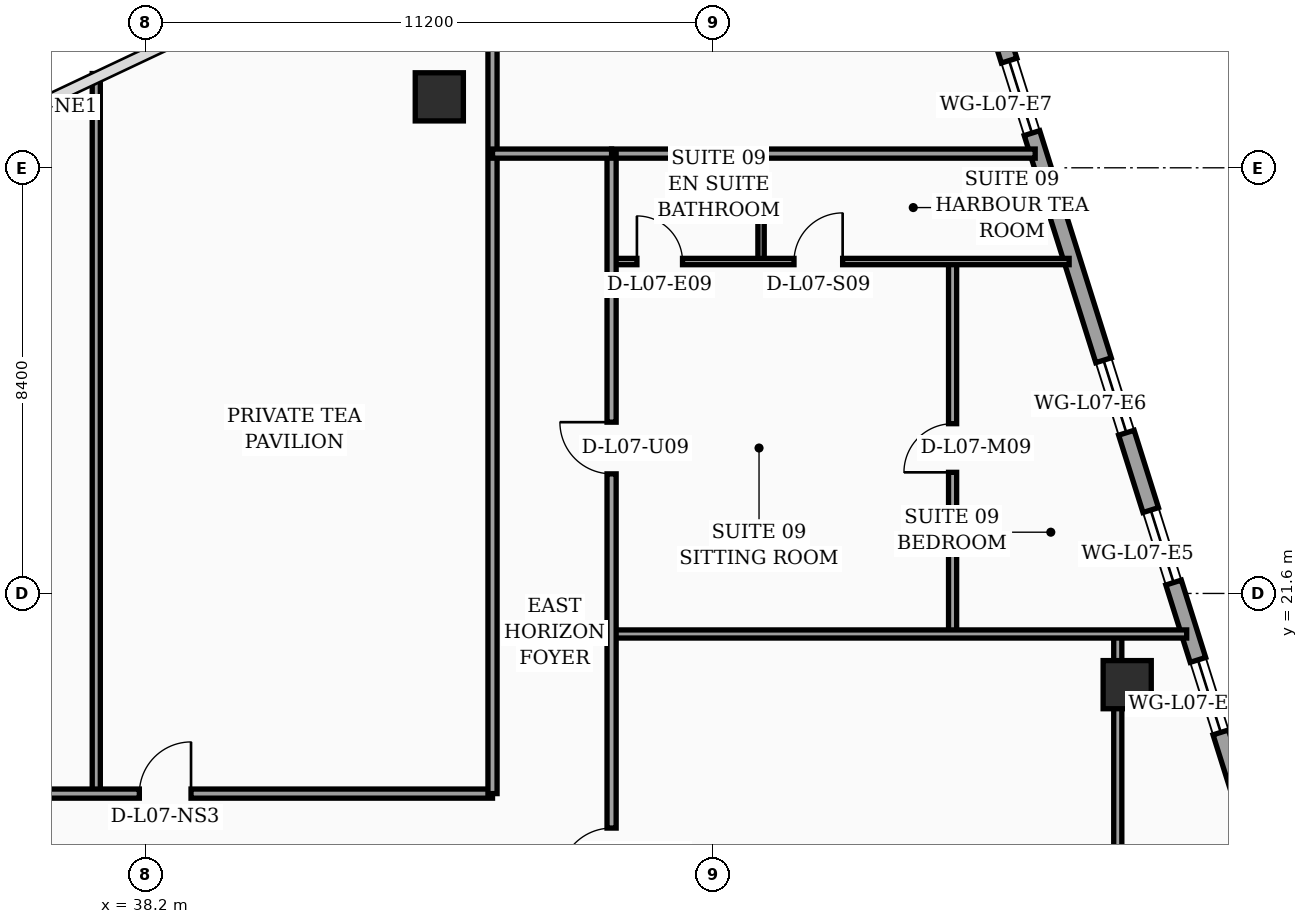
"""IFC4 building model, lengths in metres.
Left out: names, types, materials, properties, quantities, classifications, styles, units other than length and angle.
Written with IfcOpenShell. Run it as: python <this file> out.ifc"""

import sys

from ifc_helpers import new_model, si_unit, direction, frame, frame_2d, origin, origin_2d, place, context, subcontext, project, spatial, rectangle, hollow_rectangle, extrude, element, fill, save


model = new_model("IFC4")
c1 = context("Model", 3, precision=1e-05, world=origin(), true_north=direction((0.0, 1.0)))
c2 = subcontext(c1, "Body", "Model", "MODEL_VIEW")
j1 = project(units=[si_unit("LENGTHUNIT", "METRE"), si_unit("PLANEANGLEUNIT", "RADIAN")], contexts=[c1])
p1 = place(None, origin())
s1 = spatial("IfcSite", under=j1, at=p1, CompositionType="ELEMENT")
p2 = place(p1, origin())
s2 = spatial("IfcBuilding", under=s1, at=p2, CompositionType="ELEMENT")
p3 = place(p2, frame((0.0, 0.0, 34.6)))
s3 = spatial("IfcBuildingStorey", under=s2, at=p3, CompositionType="ELEMENT", Elevation=34.6)
for number, where, z_axis, x_axis in (
    (1, (44.0, 31.4, 0.0), (0.0, 0.0, 1.0), (1.0, 0.0, 0.0)),
    (2, (57.576, 19.8, 0.0), (0.0, 0.0, 1.0), (1.0, 0.0, 0.0)),
):
    element("IfcColumn", number, at=place(p3, frame(where, z_axis=z_axis, x_axis=x_axis)), inside=s3, PredefinedType="COLUMN", context=c2, shape_type="SweptSolid", body=[
        extrude(hollow_rectangle(XDim=0.95, YDim=0.95, WallThickness=0.04, at=origin_2d()), origin(), (0.0, 0.0, 1.0), 3.56),
    ])
p4 = place(p3, frame((63.63, 5.505, 0.0), z_axis=(0.0, 0.0, 1.0), x_axis=(-0.300501856448, 0.953781229775, 0.0)))
e3 = element("IfcWall", 3, at=p4, inside=s3, PredefinedType="SOLIDWALL", context=c2, shape_type="SweptSolid", body=[
    extrude(rectangle(XDim=30.814, YDim=0.32, at=frame_2d((15.407, 0.0))), origin(), (0.0, 0.0, 1.0), 3.56),
])
p5 = place(p4, frame((10.199, 0.0, 0.0)))
e4 = element("IfcOpeningElement", 4, at=p5, cuts=e3, PredefinedType="OPENING", context=c2, shape_type="SweptSolid", body=[
    extrude(rectangle(XDim=1.4, YDim=2.25, at=frame_2d((0.7, 1.125))), frame((0.0, 0.17, 0.0), z_axis=(0.0, -1.0, 0.0), x_axis=(1.0, 0.0, 0.0)), (0.0, 0.0, 1.0), 0.34),
])
p6 = place(p4, frame((2.65, 0.0, 0.75)))
e5 = element("IfcOpeningElement", 5, at=p6, cuts=e3, PredefinedType="OPENING", context=c2, shape_type="SweptSolid", body=[
    extrude(rectangle(XDim=1.5, YDim=1.6, at=frame_2d((0.75, 0.8))), frame((0.0, 0.17, 0.0), z_axis=(0.0, -1.0, 0.0), x_axis=(1.0, 0.0, 0.0)), (0.0, 0.0, 1.0), 0.34),
])
p7 = place(p4, frame((4.7, 0.0, 0.75)))
e6 = element("IfcOpeningElement", 6, at=p7, cuts=e3, PredefinedType="OPENING", context=c2, shape_type="SweptSolid", body=[
    extrude(rectangle(XDim=1.5, YDim=1.6, at=frame_2d((0.75, 0.8))), frame((0.0, 0.17, 0.0), z_axis=(0.0, -1.0, 0.0), x_axis=(1.0, 0.0, 0.0)), (0.0, 0.0, 1.0), 0.34),
])
p8 = place(p4, frame((7.8, 0.0, 0.75)))
e7 = element("IfcOpeningElement", 7, at=p8, cuts=e3, PredefinedType="OPENING", context=c2, shape_type="SweptSolid", body=[
    extrude(rectangle(XDim=1.5, YDim=1.6, at=frame_2d((0.75, 0.8))), frame((0.0, 0.17, 0.0), z_axis=(0.0, -1.0, 0.0), x_axis=(1.0, 0.0, 0.0)), (0.0, 0.0, 1.0), 0.34),
])
p9 = place(p4, frame((14.0, 0.0, 0.75)))
e8 = element("IfcOpeningElement", 8, at=p9, cuts=e3, PredefinedType="OPENING", context=c2, shape_type="SweptSolid", body=[
    extrude(rectangle(XDim=1.5, YDim=1.6, at=frame_2d((0.75, 0.8))), frame((0.0, 0.17, 0.0), z_axis=(0.0, -1.0, 0.0), x_axis=(1.0, 0.0, 0.0)), (0.0, 0.0, 1.0), 0.34),
])
p10 = place(p4, frame((17.1, 0.0, 0.75)))
e9 = element("IfcOpeningElement", 9, at=p10, cuts=e3, PredefinedType="OPENING", context=c2, shape_type="SweptSolid", body=[
    extrude(rectangle(XDim=1.5, YDim=1.6, at=frame_2d((0.75, 0.8))), frame((0.0, 0.17, 0.0), z_axis=(0.0, -1.0, 0.0), x_axis=(1.0, 0.0, 0.0)), (0.0, 0.0, 1.0), 0.34),
])
p11 = place(p4, frame((20.2, 0.0, 0.75)))
e10 = element("IfcOpeningElement", 10, at=p11, cuts=e3, PredefinedType="OPENING", context=c2, shape_type="SweptSolid", body=[
    extrude(rectangle(XDim=1.5, YDim=1.6, at=frame_2d((0.75, 0.8))), frame((0.0, 0.17, 0.0), z_axis=(0.0, -1.0, 0.0), x_axis=(1.0, 0.0, 0.0)), (0.0, 0.0, 1.0), 0.34),
])
p12 = place(p4, frame((26.4, 0.0, 0.75)))
e11 = element("IfcOpeningElement", 11, at=p12, cuts=e3, PredefinedType="OPENING", context=c2, shape_type="SweptSolid", body=[
    extrude(rectangle(XDim=1.5, YDim=1.6, at=frame_2d((0.75, 0.8))), frame((0.0, 0.17, 0.0), z_axis=(0.0, -1.0, 0.0), x_axis=(1.0, 0.0, 0.0)), (0.0, 0.0, 1.0), 0.34),
])
p13 = place(p3, frame((37.23, 17.65, 0.0), z_axis=(0.0, 0.0, 1.0), x_axis=(0.0, 1.0, 0.0)))
e12 = element("IfcWall", 12, at=p13, inside=s3, PredefinedType="PARTITIONING", context=c2, shape_type="SweptSolid", body=[
    extrude(rectangle(XDim=14.21, YDim=0.16, at=frame_2d((7.105, 0.0))), origin(), (0.0, 0.0, 1.0), 2.84),
])
p14 = place(p3, frame((21.5, 17.65, 0.0), z_axis=(0.0, 0.0, 1.0), x_axis=(1.0, 0.0, 0.0)))
e13 = element("IfcWall", 13, at=p14, inside=s3, PredefinedType="PARTITIONING", context=c2, shape_type="SweptSolid", body=[
    extrude(rectangle(XDim=23.55, YDim=0.18, at=frame_2d((11.775, 0.0))), origin(), (0.0, 0.0, 1.0), 2.84),
])
p15 = place(p14, frame((0.95, 0.0, 0.0)))
e14 = element("IfcOpeningElement", 14, at=p15, cuts=e13, PredefinedType="OPENING", context=c2, shape_type="SweptSolid", body=[
    extrude(rectangle(XDim=1.02, YDim=2.2, at=frame_2d((0.51, 1.1))), frame((0.0, 0.1, 0.0), z_axis=(0.0, -1.0, 0.0), x_axis=(1.0, 0.0, 0.0)), (0.0, 0.0, 1.0), 0.2),
])
p16 = place(p14, frame((9.42, 0.0, 0.0)))
e15 = element("IfcOpeningElement", 15, at=p16, cuts=e13, PredefinedType="OPENING", context=c2, shape_type="SweptSolid", body=[
    extrude(rectangle(XDim=1.02, YDim=2.2, at=frame_2d((0.51, 1.1))), frame((0.0, 0.1, 0.0), z_axis=(0.0, -1.0, 0.0), x_axis=(1.0, 0.0, 0.0)), (0.0, 0.0, 1.0), 0.2),
])
p17 = place(p14, frame((16.58, 0.0, 0.0)))
e16 = element("IfcOpeningElement", 16, at=p17, cuts=e13, PredefinedType="OPENING", context=c2, shape_type="SweptSolid", body=[
    extrude(rectangle(XDim=1.02, YDim=2.2, at=frame_2d((0.51, 1.1))), frame((0.0, 0.1, 0.0), z_axis=(0.0, -1.0, 0.0), x_axis=(1.0, 0.0, 0.0)), (0.0, 0.0, 1.0), 0.2),
])
p18 = place(p3, frame((45.05, 17.65, 0.0), z_axis=(0.0, 0.0, 1.0), x_axis=(0.0, 1.0, 0.0)))
e17 = element("IfcWall", 17, at=p18, inside=s3, PredefinedType="PARTITIONING", context=c2, shape_type="SweptSolid", body=[
    extrude(rectangle(XDim=17.9, YDim=0.18, at=frame_2d((8.95, 0.0))), origin(), (0.0, 0.0, 1.0), 2.84),
])
p19 = place(p3, frame((57.39, 7.45, 0.0), z_axis=(0.0, 0.0, 1.0), x_axis=(0.0, 1.0, 0.0)))
e18 = element("IfcWall", 18, at=p19, inside=s3, PredefinedType="PARTITIONING", context=c2, shape_type="SweptSolid", body=[
    extrude(rectangle(XDim=13.35, YDim=0.16, at=frame_2d((6.675, 0.0))), origin(), (0.0, 0.0, 1.0), 2.84),
])
p20 = place(p19, frame((6.2, 0.0, 0.0)))
e19 = element("IfcOpeningElement", 19, at=p20, cuts=e18, PredefinedType="OPENING", context=c2, shape_type="SweptSolid", body=[
    extrude(rectangle(XDim=0.96, YDim=2.2, at=frame_2d((0.48, 1.1))), frame((0.0, 0.09, 0.0), z_axis=(0.0, -1.0, 0.0), x_axis=(1.0, 0.0, 0.0)), (0.0, 0.0, 1.0), 0.18),
])
p21 = place(p3, frame((50.35, 28.15, 0.0), z_axis=(0.0, 0.0, 1.0), x_axis=(0.0, 1.0, 0.0)))
e20 = element("IfcWall", 20, at=p21, inside=s3, PredefinedType="PARTITIONING", context=c2, shape_type="SweptSolid", body=[
    extrude(rectangle(XDim=2.13, YDim=0.125, at=frame_2d((1.065, 0.0))), origin(), (0.0, 0.0, 1.0), 3.56),
])
p22 = place(p3, frame((54.13, 20.8, 0.0), z_axis=(0.0, 0.0, 1.0), x_axis=(0.0, 1.0, 0.0)))
e21 = element("IfcWall", 21, at=p22, inside=s3, PredefinedType="PARTITIONING", context=c2, shape_type="SweptSolid", body=[
    extrude(rectangle(XDim=7.35, YDim=0.16, at=frame_2d((3.675, 0.0))), origin(), (0.0, 0.0, 1.0), 3.19),
])
p23 = place(p22, frame((3.19, 0.0, 0.0)))
e22 = element("IfcOpeningElement", 22, at=p23, cuts=e21, PredefinedType="OPENING", context=c2, shape_type="SweptSolid", body=[
    extrude(rectangle(XDim=0.96, YDim=2.2, at=frame_2d((0.48, 1.1))), frame((0.0, 0.09, 0.0), z_axis=(0.0, -1.0, 0.0), x_axis=(1.0, 0.0, 0.0)), (0.0, 0.0, 1.0), 0.18),
])
p24 = place(p3, frame((47.4, 28.15, 0.0), z_axis=(0.0, 0.0, 1.0), x_axis=(1.0, 0.0, 0.0)))
e23 = element("IfcWall", 23, at=p24, inside=s3, PredefinedType="PARTITIONING", context=c2, shape_type="SweptSolid", body=[
    extrude(rectangle(XDim=9.03, YDim=0.125, at=frame_2d((4.515, 0.0))), origin(), (0.0, 0.0, 1.0), 2.84),
])
p25 = place(p24, frame((0.5, 0.0, 0.0)))
e24 = element("IfcOpeningElement", 24, at=p25, cuts=e23, PredefinedType="OPENING", context=c2, shape_type="SweptSolid", body=[
    extrude(rectangle(XDim=0.9, YDim=2.15, at=frame_2d((0.45, 1.075))), frame((0.0, 0.073, 0.0), z_axis=(0.0, -1.0, 0.0), x_axis=(1.0, 0.0, 0.0)), (0.0, 0.0, 1.0), 0.145),
])
p26 = place(p24, frame((3.6, 0.0, 0.0)))
e25 = element("IfcOpeningElement", 25, at=p26, cuts=e23, PredefinedType="OPENING", context=c2, shape_type="SweptSolid", body=[
    extrude(rectangle(XDim=0.96, YDim=2.2, at=frame_2d((0.48, 1.1))), frame((0.0, 0.073, 0.0), z_axis=(0.0, -1.0, 0.0), x_axis=(1.0, 0.0, 0.0)), (0.0, 0.0, 1.0), 0.145),
])
p27 = place(p3, frame((47.4, 20.8, 0.0), z_axis=(0.0, 0.0, 1.0), x_axis=(1.0, 0.0, 0.0)))
e26 = element("IfcWall", 26, at=p27, inside=s3, PredefinedType="PARTITIONING", context=c2, shape_type="SweptSolid", body=[
    extrude(rectangle(XDim=11.35, YDim=0.16, at=frame_2d((5.675, 0.0))), origin(), (0.0, 0.0, 1.0), 3.04),
])
p28 = place(p3, frame((47.4, 30.28, 0.0), z_axis=(0.0, 0.0, 1.0), x_axis=(1.0, 0.0, 0.0)))
e27 = element("IfcWall", 27, at=p28, inside=s3, PredefinedType="PARTITIONING", context=c2, shape_type="SweptSolid", body=[
    extrude(rectangle(XDim=8.36, YDim=0.18, at=frame_2d((4.18, 0.0))), origin(), (0.0, 0.0, 1.0), 2.84),
])
p29 = place(p3, frame((47.4, 2.44, 0.0), z_axis=(0.0, 0.0, 1.0), x_axis=(0.0, 1.0, 0.0)))
e28 = element("IfcWall", 28, at=p29, inside=s3, PredefinedType="PARTITIONING", context=c2, shape_type="SweptSolid", body=[
    extrude(rectangle(XDim=27.84, YDim=0.18, at=frame_2d((13.92, 0.0))), origin(), (0.0, 0.0, 1.0), 2.84),
])
p30 = place(p29, frame((13.51, 0.0, 0.0)))
e29 = element("IfcOpeningElement", 29, at=p30, cuts=e28, PredefinedType="OPENING", context=c2, shape_type="SweptSolid", body=[
    extrude(rectangle(XDim=1.02, YDim=2.2, at=frame_2d((0.51, 1.1))), frame((0.0, 0.1, 0.0), z_axis=(0.0, -1.0, 0.0), x_axis=(1.0, 0.0, 0.0)), (0.0, 0.0, 1.0), 0.2),
])
p31 = place(p29, frame((21.52, 0.0, 0.0)))
e30 = element("IfcOpeningElement", 30, at=p31, cuts=e28, PredefinedType="OPENING", context=c2, shape_type="SweptSolid", body=[
    extrude(rectangle(XDim=1.02, YDim=2.2, at=frame_2d((0.51, 1.1))), frame((0.0, 0.1, 0.0), z_axis=(0.0, -1.0, 0.0), x_axis=(1.0, 0.0, 0.0)), (0.0, 0.0, 1.0), 0.2),
])
p32 = place(p3, frame((45.05, 30.28, 0.0), z_axis=(0.0, 0.0, 1.0), x_axis=(1.0, 0.0, 0.0)))
e31 = element("IfcWall", 31, at=p32, inside=s3, PredefinedType="PARTITIONING", context=c2, shape_type="SweptSolid", body=[
    extrude(rectangle(XDim=2.35, YDim=0.18, at=frame_2d((1.175, 0.0))), origin(), (0.0, 0.0, 1.0), 3.56),
])
p33 = place(p9, origin())
e32 = element("IfcWindow", 32, at=p33, inside=s3, PartitioningType="SINGLE_PANEL", PredefinedType="WINDOW", context=c2, shape_type="SweptSolid", body=[
    extrude(rectangle(XDim=1.5, YDim=1.6, at=frame_2d((0.75, 0.8))), frame((0.0, 0.03, 0.0), z_axis=(0.0, -1.0, 0.0), x_axis=(1.0, 0.0, 0.0)), (0.0, 0.0, 1.0), 0.06),
])
fill(e8, e32)
p34 = place(p10, origin())
e33 = element("IfcWindow", 33, at=p34, inside=s3, PartitioningType="SINGLE_PANEL", PredefinedType="WINDOW", context=c2, shape_type="SweptSolid", body=[
    extrude(rectangle(XDim=1.5, YDim=1.6, at=frame_2d((0.75, 0.8))), frame((0.0, 0.03, 0.0), z_axis=(0.0, -1.0, 0.0), x_axis=(1.0, 0.0, 0.0)), (0.0, 0.0, 1.0), 0.06),
])
fill(e9, e33)
p35 = place(p11, origin())
e34 = element("IfcWindow", 34, at=p35, inside=s3, PartitioningType="SINGLE_PANEL", PredefinedType="WINDOW", context=c2, shape_type="SweptSolid", body=[
    extrude(rectangle(XDim=1.5, YDim=1.6, at=frame_2d((0.75, 0.8))), frame((0.0, 0.03, 0.0), z_axis=(0.0, -1.0, 0.0), x_axis=(1.0, 0.0, 0.0)), (0.0, 0.0, 1.0), 0.06),
])
fill(e10, e34)
p36 = place(p12, origin())
e35 = element("IfcWindow", 35, at=p36, inside=s3, PartitioningType="SINGLE_PANEL", PredefinedType="WINDOW", context=c2, shape_type="SweptSolid", body=[
    extrude(rectangle(XDim=1.5, YDim=1.6, at=frame_2d((0.75, 0.8))), frame((0.0, 0.03, 0.0), z_axis=(0.0, -1.0, 0.0), x_axis=(1.0, 0.0, 0.0)), (0.0, 0.0, 1.0), 0.06),
])
fill(e11, e35)
p37 = place(p17, origin())
e36 = element("IfcDoor", 36, at=p37, inside=s3, OperationType="SINGLE_SWING_RIGHT", PredefinedType="DOOR", context=c2, shape_type="SweptSolid", body=[
    extrude(rectangle(XDim=1.02, YDim=2.2, at=frame_2d((0.51, 1.1))), frame((0.0, 0.025, 0.0), z_axis=(0.0, -1.0, 0.0), x_axis=(1.0, 0.0, 0.0)), (0.0, 0.0, 1.0), 0.05),
])
fill(e16, e36)
p38 = place(p23, origin())
e37 = element("IfcDoor", 37, at=p38, inside=s3, OperationType="SINGLE_SWING_LEFT", PredefinedType="DOOR", context=c2, shape_type="SweptSolid", body=[
    extrude(rectangle(XDim=0.96, YDim=2.2, at=frame_2d((0.48, 1.1))), frame((0.0, 0.025, 0.0), z_axis=(0.0, -1.0, 0.0), x_axis=(1.0, 0.0, 0.0)), (0.0, 0.0, 1.0), 0.05),
])
fill(e22, e37)
p39 = place(p25, origin())
e38 = element("IfcDoor", 38, at=p39, inside=s3, OperationType="SINGLE_SWING_LEFT", PredefinedType="DOOR", context=c2, shape_type="SweptSolid", body=[
    extrude(rectangle(XDim=0.9, YDim=2.15, at=frame_2d((0.45, 1.075))), frame((0.0, 0.025, 0.0), z_axis=(0.0, -1.0, 0.0), x_axis=(1.0, 0.0, 0.0)), (0.0, 0.0, 1.0), 0.05),
])
fill(e24, e38)
p40 = place(p26, origin())
e39 = element("IfcDoor", 39, at=p40, inside=s3, OperationType="SINGLE_SWING_RIGHT", PredefinedType="DOOR", context=c2, shape_type="SweptSolid", body=[
    extrude(rectangle(XDim=0.96, YDim=2.2, at=frame_2d((0.48, 1.1))), frame((0.0, 0.025, 0.0), z_axis=(0.0, -1.0, 0.0), x_axis=(1.0, 0.0, 0.0)), (0.0, 0.0, 1.0), 0.05),
])
fill(e25, e39)
p41 = place(p30, origin())
e40 = element("IfcDoor", 40, at=p41, inside=s3, OperationType="SINGLE_SWING_LEFT", PredefinedType="DOOR", context=c2, shape_type="SweptSolid", body=[
    extrude(rectangle(XDim=1.02, YDim=2.2, at=frame_2d((0.51, 1.1))), frame((0.0, 0.025, 0.0), z_axis=(0.0, -1.0, 0.0), x_axis=(1.0, 0.0, 0.0)), (0.0, 0.0, 1.0), 0.05),
])
fill(e29, e40)
p42 = place(p31, origin())
e41 = element("IfcDoor", 41, at=p42, inside=s3, OperationType="SINGLE_SWING_RIGHT", PredefinedType="DOOR", context=c2, shape_type="SweptSolid", body=[
    extrude(rectangle(XDim=1.02, YDim=2.2, at=frame_2d((0.51, 1.1))), frame((0.0, 0.025, 0.0), z_axis=(0.0, -1.0, 0.0), x_axis=(1.0, 0.0, 0.0)), (0.0, 0.0, 1.0), 0.05),
])
fill(e30, e41)
save(model, sys.argv[1])
